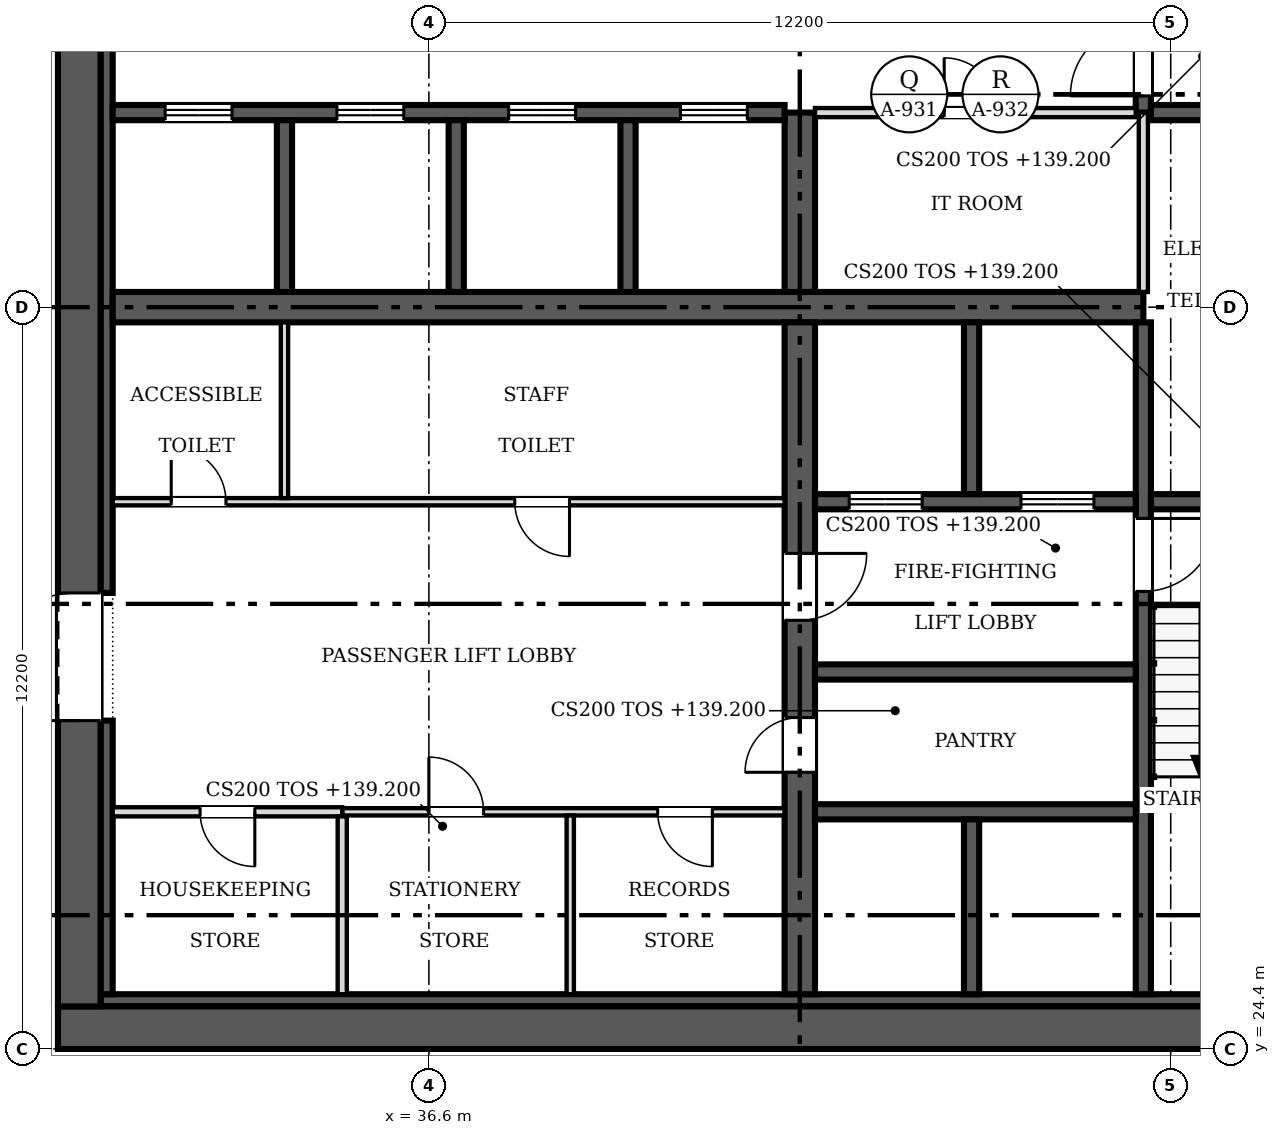
"""IFC4 building model, lengths in metres.
Left out: names, types, materials, properties, quantities, classifications, styles, units other than length and angle.
Written with IfcOpenShell. Run it as: python <this file> out.ifc"""

import sys

from ifc_helpers import new_model, si_unit, direction, frame, frame_2d, origin, place, context, subcontext, project, spatial, rectangle, extrude, source, transform, mapped, element, fill, save


model = new_model("IFC4")
c1 = context("Model", 3, precision=1e-05, world=origin(), true_north=direction((0.0, 1.0)))
c2 = subcontext(c1, "Body", "Model", "MODEL_VIEW")
j1 = project(units=[si_unit("LENGTHUNIT", "METRE"), si_unit("PLANEANGLEUNIT", "RADIAN")], contexts=[c1])
p1 = place(None, origin())
s1 = spatial("IfcSite", under=j1, at=p1, CompositionType="ELEMENT")
p2 = place(p1, origin())
s2 = spatial("IfcBuilding", under=s1, at=p2, CompositionType="ELEMENT")
p3 = place(p2, frame((0.0, 0.0, 139.2)))
s3 = spatial("IfcBuildingStorey", under=s2, at=p3, CompositionType="ELEMENT", Elevation=139.2)
p4 = place(p3, frame((54.9, 24.75, 0.0), z_axis=(0.0, 0.0, 1.0), x_axis=(-1.0, 0.0, 0.0)))
e1 = element("IfcWall", 1, at=p4, inside=s3, PredefinedType="SHEAR", context=c2, shape_type="SweptSolid", body=[
    extrude(rectangle(XDim=24.4, YDim=0.7, at=frame_2d((12.2, 0.0))), origin(), (0.0, 0.0, 1.0), 3.8),
])
m1 = source(origin(), c2, "Body", "SweptSolid", [
    extrude(rectangle(XDim=1.2, YDim=2.1, at=frame_2d((0.6, 1.05))), frame((0.0, 0.36, 0.0), z_axis=(0.0, -1.0, 0.0), x_axis=(1.0, 0.0, 0.0)), (0.0, 0.0, 1.0), 0.72),
])
p5 = place(p4, frame((1.5, 0.0, 0.0)))
e2 = element("IfcOpeningElement", 2, at=p5, cuts=e1, PredefinedType="OPENING", context=c2, shape_type="MappedRepresentation", body=[
    mapped(m1, transform((0.0, 0.0, 0.0), scale=1.0)),
])
p6 = place(p3, frame((30.85, 25.1, 0.0), z_axis=(0.0, 0.0, 1.0), x_axis=(0.0, 1.0, 0.0)))
e3 = element("IfcWall", 3, at=p6, inside=s3, PredefinedType="SHEAR", context=c2, shape_type="SweptSolid", body=[
    extrude(rectangle(XDim=23.0, YDim=0.7, at=frame_2d((11.5, 0.0))), origin(), (0.0, 0.0, 1.0), 3.8),
])
m2 = source(origin(), c2, "Body", "SweptSolid", [
    extrude(rectangle(XDim=2.1, YDim=2.4, at=frame_2d((1.05, 1.2))), frame((0.0, 0.36, 0.0), z_axis=(0.0, -1.0, 0.0), x_axis=(1.0, 0.0, 0.0)), (0.0, 0.0, 1.0), 0.72),
])
p7 = place(p6, frame((4.7, 0.0, 0.0)))
e4 = element("IfcOpeningElement", 4, at=p7, cuts=e3, PredefinedType="OPENING", context=c2, shape_type="MappedRepresentation", body=[
    mapped(m2, transform((0.0, 0.0, 0.0), scale=1.0)),
])
p8 = place(p6, frame((16.2, 0.0, 0.0)))
e5 = element("IfcOpeningElement", 5, at=p8, cuts=e3, PredefinedType="OPENING", context=c2, shape_type="MappedRepresentation", body=[
    mapped(m2, transform((0.0, 0.0, 0.0), scale=1.0)),
])
p9 = place(p3, frame((31.2, 25.2, 0.0), z_axis=(0.0, 0.0, 1.0), x_axis=(1.0, 0.0, 0.0)))
e6 = element("IfcWall", 6, at=p9, inside=s3, PredefinedType="SOLIDWALL", context=c2, shape_type="SweptSolid", body=[
    extrude(rectangle(XDim=21.0, YDim=0.2, at=frame_2d((10.5, 0.0))), origin(), (0.0, 0.0, 1.0), 3.8),
])
p10 = place(p3, frame((31.3, 25.3, 0.0), z_axis=(0.0, 0.0, 1.0), x_axis=(0.0, 1.0, 0.0)))
e7 = element("IfcWall", 7, at=p10, inside=s3, PredefinedType="SOLIDWALL", context=c2, shape_type="SweptSolid", body=[
    extrude(rectangle(XDim=4.5, YDim=0.2, at=frame_2d((2.25, 0.0))), origin(), (0.0, 0.0, 1.0), 3.8),
])
p11 = place(p3, frame((31.3, 31.9, 0.0), z_axis=(0.0, 0.0, 1.0), x_axis=(0.0, 1.0, 0.0)))
e8 = element("IfcWall", 8, at=p11, inside=s3, PredefinedType="SOLIDWALL", context=c2, shape_type="SweptSolid", body=[
    extrude(rectangle(XDim=9.4, YDim=0.2, at=frame_2d((4.7, 0.0))), origin(), (0.0, 0.0, 1.0), 3.8),
])
p12 = place(p3, frame((31.4, 36.6, 0.0), z_axis=(0.0, 0.0, 1.0), x_axis=(1.0, 0.0, 0.0)))
e9 = element("IfcWall", 9, at=p12, inside=s3, PredefinedType="SHEAR", context=c2, shape_type="SweptSolid", body=[
    extrude(rectangle(XDim=16.95, YDim=0.5, at=frame_2d((8.475, 0.0))), origin(), (0.0, 0.0, 1.0), 3.8),
])
p13 = place(p3, frame((42.7, 36.35, 0.0), z_axis=(0.0, 0.0, 1.0), x_axis=(0.0, -1.0, 0.0)))
e10 = element("IfcWall", 10, at=p13, inside=s3, PredefinedType="SHEAR", context=c2, shape_type="SweptSolid", body=[
    extrude(rectangle(XDim=11.05, YDim=0.5, at=frame_2d((5.525, 0.0))), origin(), (0.0, 0.0, 1.0), 3.8),
])
m3 = source(origin(), c2, "Body", "SweptSolid", [
    extrude(rectangle(XDim=0.9, YDim=2.1, at=frame_2d((0.45, 1.05))), frame((0.0, 0.26, 0.0), z_axis=(0.0, -1.0, 0.0), x_axis=(1.0, 0.0, 0.0)), (0.0, 0.0, 1.0), 0.52),
])
p14 = place(p13, frame((6.5, 0.0, 0.0)))
e11 = element("IfcOpeningElement", 11, at=p14, cuts=e10, PredefinedType="OPENING", context=c2, shape_type="MappedRepresentation", body=[
    mapped(m3, transform((0.0, 0.0, 0.0), scale=1.0)),
])
m4 = source(origin(), c2, "Body", "SweptSolid", [
    extrude(rectangle(XDim=1.1, YDim=2.1, at=frame_2d((0.55, 1.05))), frame((0.0, 0.26, 0.0), z_axis=(0.0, -1.0, 0.0), x_axis=(1.0, 0.0, 0.0)), (0.0, 0.0, 1.0), 0.52),
])
p15 = place(p13, frame((3.8, 0.0, 0.0)))
e12 = element("IfcOpeningElement", 12, at=p15, cuts=e10, PredefinedType="OPENING", context=c2, shape_type="MappedRepresentation", body=[
    mapped(m4, transform((0.0, 0.0, 0.0), scale=1.0)),
])
p16 = place(p3, frame((42.7, 36.85, 0.0), z_axis=(0.0, 0.0, 1.0), x_axis=(0.0, 1.0, 0.0)))
e13 = element("IfcWall", 13, at=p16, inside=s3, PredefinedType="SHEAR", context=c2, shape_type="SweptSolid", body=[
    extrude(rectangle(XDim=2.95, YDim=0.5, at=frame_2d((1.475, 0.0))), origin(), (0.0, 0.0, 1.0), 3.8),
])
p17 = place(p3, frame((31.4, 39.8, 0.0), z_axis=(0.0, 0.0, 1.0), x_axis=(1.0, 0.0, 0.0)))
e14 = element("IfcWall", 14, at=p17, inside=s3, PredefinedType="SOLIDWALL", context=c2, shape_type="SweptSolid", body=[
    extrude(rectangle(XDim=11.05, YDim=0.25, at=frame_2d((5.525, 0.0))), origin(), (0.0, 0.0, 1.0), 3.8),
])
m5 = source(origin(), c2, "Body", "SweptSolid", [
    extrude(rectangle(XDim=1.1, YDim=2.1, at=frame_2d((0.55, 1.05))), frame((0.0, 0.135, 0.0), z_axis=(0.0, -1.0, 0.0), x_axis=(1.0, 0.0, 0.0)), (0.0, 0.0, 1.0), 0.27),
])
p18 = place(p17, frame((0.863, 0.0, 0.0)))
e15 = element("IfcOpeningElement", 15, at=p18, cuts=e14, PredefinedType="OPENING", context=c2, shape_type="MappedRepresentation", body=[
    mapped(m5, transform((0.0, 0.0, 0.0), scale=1.0)),
])
p19 = place(p17, frame((3.688, 0.0, 0.0)))
e16 = element("IfcOpeningElement", 16, at=p19, cuts=e14, PredefinedType="OPENING", context=c2, shape_type="MappedRepresentation", body=[
    mapped(m5, transform((0.0, 0.0, 0.0), scale=1.0)),
])
p20 = place(p17, frame((6.512, 0.0, 0.0)))
e17 = element("IfcOpeningElement", 17, at=p20, cuts=e14, PredefinedType="OPENING", context=c2, shape_type="MappedRepresentation", body=[
    mapped(m5, transform((0.0, 0.0, 0.0), scale=1.0)),
])
p21 = place(p17, frame((9.337, 0.0, 0.0)))
e18 = element("IfcOpeningElement", 18, at=p21, cuts=e14, PredefinedType="OPENING", context=c2, shape_type="MappedRepresentation", body=[
    mapped(m5, transform((0.0, 0.0, 0.0), scale=1.0)),
])
p22 = place(p3, frame((48.35, 36.35, 0.0), z_axis=(0.0, 0.0, 1.0), x_axis=(0.0, -1.0, 0.0)))
e19 = element("IfcWall", 19, at=p22, inside=s3, PredefinedType="SOLIDWALL", context=c2, shape_type="SweptSolid", body=[
    extrude(rectangle(XDim=11.05, YDim=0.25, at=frame_2d((5.525, 0.0))), origin(), (0.0, 0.0, 1.0), 3.8),
])
m6 = source(origin(), c2, "Body", "SweptSolid", [
    extrude(rectangle(XDim=1.2, YDim=2.1, at=frame_2d((0.6, 1.05))), frame((0.0, 0.135, 0.0), z_axis=(0.0, -1.0, 0.0), x_axis=(1.0, 0.0, 0.0)), (0.0, 0.0, 1.0), 0.27),
])
p23 = place(p22, frame((3.225, 0.0, 0.0)))
e20 = element("IfcOpeningElement", 20, at=p23, cuts=e19, PredefinedType="OPENING", context=c2, shape_type="MappedRepresentation", body=[
    mapped(m6, transform((0.0, 0.0, 0.0), scale=1.0)),
])
p24 = place(p3, frame((48.225, 33.4, 0.0), z_axis=(0.0, 0.0, 1.0), x_axis=(-1.0, 0.0, 0.0)))
e21 = element("IfcWall", 21, at=p24, inside=s3, PredefinedType="SOLIDWALL", context=c2, shape_type="SweptSolid", body=[
    extrude(rectangle(XDim=5.275, YDim=0.25, at=frame_2d((2.638, 0.0))), origin(), (0.0, 0.0, 1.0), 3.8),
])
p25 = place(p24, frame((3.512, 0.0, 0.0)))
e22 = element("IfcOpeningElement", 22, at=p25, cuts=e21, PredefinedType="OPENING", context=c2, shape_type="MappedRepresentation", body=[
    mapped(m6, transform((0.0, 0.0, 0.0), scale=1.0)),
])
p26 = place(p24, frame((0.688, 0.0, 0.0)))
e23 = element("IfcOpeningElement", 23, at=p26, cuts=e21, PredefinedType="OPENING", context=c2, shape_type="MappedRepresentation", body=[
    mapped(m6, transform((0.0, 0.0, 0.0), scale=1.0)),
])
p27 = place(p3, frame((48.475, 33.4, 0.0), z_axis=(0.0, 0.0, 1.0), x_axis=(1.0, 0.0, 0.0)))
e24 = element("IfcWall", 24, at=p27, inside=s3, PredefinedType="SOLIDWALL", context=c2, shape_type="SweptSolid", body=[
    extrude(rectangle(XDim=3.525, YDim=0.25, at=frame_2d((1.762, 0.0))), origin(), (0.0, 0.0, 1.0), 3.8),
])
p28 = place(p3, frame((48.35, 47.9, 0.0), z_axis=(0.0, 0.0, 1.0), x_axis=(0.0, -1.0, 0.0)))
e25 = element("IfcWall", 25, at=p28, inside=s3, PredefinedType="SOLIDWALL", context=c2, shape_type="SweptSolid", body=[
    extrude(rectangle(XDim=8.1, YDim=0.25, at=frame_2d((4.05, 0.0))), origin(), (0.0, 0.0, 1.0), 3.8),
])
p29 = place(p28, frame((6.625, 0.0, 0.0)))
e26 = element("IfcOpeningElement", 26, at=p29, cuts=e25, PredefinedType="OPENING", context=c2, shape_type="MappedRepresentation", body=[
    mapped(m6, transform((0.0, 0.0, 0.0), scale=1.0)),
])
for number, where, z_axis, x_axis in (
    (27, (42.95, 28.3, 0.0), (0.0, 0.0, 1.0), (1.0, 0.0, 0.0)),
    (28, (42.95, 30.6, 0.0), (0.0, 0.0, 1.0), (1.0, 0.0, 0.0)),
):
    element("IfcWall", number, at=place(p3, frame(where, z_axis=z_axis, x_axis=x_axis)), inside=s3, PredefinedType="SOLIDWALL", context=c2, shape_type="SweptSolid", body=[
        extrude(rectangle(XDim=5.275, YDim=0.25, at=frame_2d((2.638, 0.0))), origin(), (0.0, 0.0, 1.0), 3.8),
    ])
p30 = place(p3, frame((48.475, 39.8, 0.0), z_axis=(0.0, 0.0, 1.0), x_axis=(1.0, 0.0, 0.0)))
e29 = element("IfcWall", 29, at=p30, inside=s3, PredefinedType="SOLIDWALL", context=c2, shape_type="SweptSolid", body=[
    extrude(rectangle(XDim=3.4, YDim=0.25, at=frame_2d((1.7, 0.0))), origin(), (0.0, 0.0, 1.0), 3.8),
])
for number, where, z_axis, x_axis in (
    (30, (34.225, 36.85, 0.0), (0.0, 0.0, 1.0), (0.0, 1.0, 0.0)),
    (31, (37.05, 36.85, 0.0), (0.0, 0.0, 1.0), (0.0, 1.0, 0.0)),
    (32, (39.875, 36.85, 0.0), (0.0, 0.0, 1.0), (0.0, 1.0, 0.0)),
):
    element("IfcWall", number, at=place(p3, frame(where, z_axis=z_axis, x_axis=x_axis)), inside=s3, PredefinedType="SOLIDWALL", context=c2, shape_type="SweptSolid", body=[
        extrude(rectangle(XDim=2.825, YDim=0.25, at=frame_2d((1.413, 0.0))), origin(), (0.0, 0.0, 1.0), 3.8),
    ])
p31 = place(p3, frame((45.525, 33.525, 0.0), z_axis=(0.0, 0.0, 1.0), x_axis=(0.0, 1.0, 0.0)))
e33 = element("IfcWall", 33, at=p31, inside=s3, PredefinedType="SOLIDWALL", context=c2, shape_type="SweptSolid", body=[
    extrude(rectangle(XDim=2.825, YDim=0.25, at=frame_2d((1.413, 0.0))), origin(), (0.0, 0.0, 1.0), 3.8),
])
p32 = place(p3, frame((45.525, 25.3, 0.0), z_axis=(0.0, 0.0, 1.0), x_axis=(0.0, 1.0, 0.0)))
e34 = element("IfcWall", 34, at=p32, inside=s3, PredefinedType="SOLIDWALL", context=c2, shape_type="SweptSolid", body=[
    extrude(rectangle(XDim=2.875, YDim=0.25, at=frame_2d((1.438, 0.0))), origin(), (0.0, 0.0, 1.0), 3.8),
])
p33 = place(p3, frame((31.4, 33.4, 0.0), z_axis=(0.0, 0.0, 1.0), x_axis=(1.0, 0.0, 0.0)))
e35 = element("IfcWall", 35, at=p33, inside=s3, PredefinedType="PARTITIONING", context=c2, shape_type="SweptSolid", body=[
    extrude(rectangle(XDim=11.05, YDim=0.12, at=frame_2d((5.525, 0.0))), origin(), (0.0, 0.0, 1.0), 3.6),
])
m7 = source(origin(), c2, "Body", "SweptSolid", [
    extrude(rectangle(XDim=0.9, YDim=2.1, at=frame_2d((0.45, 1.05))), frame((0.0, 0.07, 0.0), z_axis=(0.0, -1.0, 0.0), x_axis=(1.0, 0.0, 0.0)), (0.0, 0.0, 1.0), 0.14),
])
p34 = place(p33, frame((0.962, 0.0, 0.0)))
e36 = element("IfcOpeningElement", 36, at=p34, cuts=e35, PredefinedType="OPENING", context=c2, shape_type="MappedRepresentation", body=[
    mapped(m7, transform((0.0, 0.0, 0.0), scale=1.0)),
])
p35 = place(p33, frame((6.613, 0.0, 0.0)))
e37 = element("IfcOpeningElement", 37, at=p35, cuts=e35, PredefinedType="OPENING", context=c2, shape_type="MappedRepresentation", body=[
    mapped(m7, transform((0.0, 0.0, 0.0), scale=1.0)),
])
p36 = place(p3, frame((42.45, 28.3, 0.0), z_axis=(0.0, 0.0, 1.0), x_axis=(-1.0, 0.0, 0.0)))
e38 = element("IfcWall", 38, at=p36, inside=s3, PredefinedType="PARTITIONING", context=c2, shape_type="SweptSolid", body=[
    extrude(rectangle(XDim=7.275, YDim=0.12, at=frame_2d((3.637, 0.0))), origin(), (0.0, 0.0, 1.0), 3.6),
])
p37 = place(p36, frame((4.95, 0.0, 0.0)))
e39 = element("IfcOpeningElement", 39, at=p37, cuts=e38, PredefinedType="OPENING", context=c2, shape_type="MappedRepresentation", body=[
    mapped(m7, transform((0.0, 0.0, 0.0), scale=1.0)),
])
p38 = place(p36, frame((1.188, 0.0, 0.0)))
e40 = element("IfcOpeningElement", 40, at=p38, cuts=e38, PredefinedType="OPENING", context=c2, shape_type="MappedRepresentation", body=[
    mapped(m7, transform((0.0, 0.0, 0.0), scale=1.0)),
])
p39 = place(p3, frame((48.225, 39.8, 0.0), z_axis=(0.0, 0.0, 1.0), x_axis=(-1.0, 0.0, 0.0)))
e41 = element("IfcWall", 41, at=p39, inside=s3, PredefinedType="PARTITIONING", context=c2, shape_type="SweptSolid", body=[
    extrude(rectangle(XDim=5.275, YDim=0.15, at=frame_2d((2.638, 0.0))), origin(), (0.0, 0.0, 1.0), 3.6),
])
m8 = source(origin(), c2, "Body", "SweptSolid", [
    extrude(rectangle(XDim=0.9, YDim=2.1, at=frame_2d((0.45, 1.05))), frame((0.0, 0.085, 0.0), z_axis=(0.0, -1.0, 0.0), x_axis=(1.0, 0.0, 0.0)), (0.0, 0.0, 1.0), 0.17),
])
p40 = place(p39, frame((2.25, 0.0, 0.0)))
e42 = element("IfcOpeningElement", 42, at=p40, cuts=e41, PredefinedType="OPENING", context=c2, shape_type="MappedRepresentation", body=[
    mapped(m8, transform((0.0, 0.0, 0.0), scale=1.0)),
])
p41 = place(p3, frame((35.175, 28.3, 0.0), z_axis=(0.0, 0.0, 1.0), x_axis=(-1.0, 0.0, 0.0)))
e43 = element("IfcWall", 43, at=p41, inside=s3, PredefinedType="PARTITIONING", context=c2, shape_type="SweptSolid", body=[
    extrude(rectangle(XDim=3.775, YDim=0.15, at=frame_2d((1.888, 0.0))), origin(), (0.0, 0.0, 1.0), 3.6),
])
p42 = place(p41, frame((1.438, 0.0, 0.0)))
e44 = element("IfcOpeningElement", 44, at=p42, cuts=e43, PredefinedType="OPENING", context=c2, shape_type="MappedRepresentation", body=[
    mapped(m8, transform((0.0, 0.0, 0.0), scale=1.0)),
])
p43 = place(p3, frame((48.35, 36.85, 0.0), z_axis=(0.0, 0.0, 1.0), x_axis=(0.0, 1.0, 0.0)))
e45 = element("IfcWall", 45, at=p43, inside=s3, PredefinedType="PARTITIONING", context=c2, shape_type="SweptSolid", body=[
    extrude(rectangle(XDim=2.95, YDim=0.15, at=frame_2d((1.475, 0.0))), origin(), (0.0, 0.0, 1.0), 3.6),
])
p44 = place(p3, frame((34.225, 33.46, 0.0), z_axis=(0.0, 0.0, 1.0), x_axis=(0.0, 1.0, 0.0)))
e46 = element("IfcWall", 46, at=p44, inside=s3, PredefinedType="PARTITIONING", context=c2, shape_type="SweptSolid", body=[
    extrude(rectangle(XDim=2.89, YDim=0.12, at=frame_2d((1.445, 0.0))), origin(), (0.0, 0.0, 1.0), 3.6),
])
p45 = place(p3, frame((35.175, 25.3, 0.0), z_axis=(0.0, 0.0, 1.0), x_axis=(0.0, 1.0, 0.0)))
e47 = element("IfcWall", 47, at=p45, inside=s3, PredefinedType="PARTITIONING", context=c2, shape_type="SweptSolid", body=[
    extrude(rectangle(XDim=2.925, YDim=0.15, at=frame_2d((1.462, 0.0))), origin(), (0.0, 0.0, 1.0), 3.6),
])
p46 = place(p3, frame((38.925, 25.3, 0.0), z_axis=(0.0, 0.0, 1.0), x_axis=(0.0, 1.0, 0.0)))
e48 = element("IfcWall", 48, at=p46, inside=s3, PredefinedType="PARTITIONING", context=c2, shape_type="SweptSolid", body=[
    extrude(rectangle(XDim=2.94, YDim=0.12, at=frame_2d((1.47, 0.0))), origin(), (0.0, 0.0, 1.0), 3.6),
])
m9 = source(origin(), c2, "Body", "SweptSolid", [
    extrude(rectangle(XDim=2.1, YDim=2.4, at=frame_2d((1.05, 1.2))), frame((0.0, 0.025, 0.0), z_axis=(0.0, -1.0, 0.0), x_axis=(1.0, 0.0, 0.0)), (0.0, 0.0, 1.0), 0.05),
])
p47 = place(p7, origin())
e49 = element("IfcDoor", 49, at=p47, inside=s3, OperationType="DOUBLE_DOOR_SINGLE_SWING", PredefinedType="DOOR", context=c2, shape_type="MappedRepresentation", body=[
    mapped(m9, transform((0.0, 0.0, 0.0), scale=1.0)),
])
fill(e4, e49)
m10 = source(origin(), c2, "Body", "SweptSolid", [
    extrude(rectangle(XDim=0.9, YDim=2.1, at=frame_2d((0.45, 1.05))), frame((0.0, 0.025, 0.0), z_axis=(0.0, -1.0, 0.0), x_axis=(1.0, 0.0, 0.0)), (0.0, 0.0, 1.0), 0.05),
])
p48 = place(p14, origin())
e50 = element("IfcDoor", 50, at=p48, inside=s3, OperationType="SINGLE_SWING_RIGHT", PredefinedType="DOOR", context=c2, shape_type="MappedRepresentation", body=[
    mapped(m10, transform((0.0, 0.0, 0.0), scale=1.0)),
])
fill(e11, e50)
m11 = source(origin(), c2, "Body", "SweptSolid", [
    extrude(rectangle(XDim=1.1, YDim=2.1, at=frame_2d((0.55, 1.05))), frame((0.0, 0.025, 0.0), z_axis=(0.0, -1.0, 0.0), x_axis=(1.0, 0.0, 0.0)), (0.0, 0.0, 1.0), 0.05),
])
p49 = place(p15, origin())
e51 = element("IfcDoor", 51, at=p49, inside=s3, OperationType="SINGLE_SWING_LEFT", PredefinedType="DOOR", context=c2, shape_type="MappedRepresentation", body=[
    mapped(m11, transform((0.0, 0.0, 0.0), scale=1.0)),
])
fill(e12, e51)
p50 = place(p18, origin())
e52 = element("IfcDoor", 52, at=p50, inside=s3, OperationType="DOUBLE_DOOR_SLIDING", PredefinedType="DOOR", context=c2, shape_type="MappedRepresentation", body=[
    mapped(m11, transform((0.0, 0.0, 0.0), scale=1.0)),
])
fill(e15, e52)
p51 = place(p19, origin())
e53 = element("IfcDoor", 53, at=p51, inside=s3, OperationType="DOUBLE_DOOR_SLIDING", PredefinedType="DOOR", context=c2, shape_type="MappedRepresentation", body=[
    mapped(m11, transform((0.0, 0.0, 0.0), scale=1.0)),
])
fill(e16, e53)
p52 = place(p20, origin())
e54 = element("IfcDoor", 54, at=p52, inside=s3, OperationType="DOUBLE_DOOR_SLIDING", PredefinedType="DOOR", context=c2, shape_type="MappedRepresentation", body=[
    mapped(m11, transform((0.0, 0.0, 0.0), scale=1.0)),
])
fill(e17, e54)
p53 = place(p21, origin())
e55 = element("IfcDoor", 55, at=p53, inside=s3, OperationType="DOUBLE_DOOR_SLIDING", PredefinedType="DOOR", context=c2, shape_type="MappedRepresentation", body=[
    mapped(m11, transform((0.0, 0.0, 0.0), scale=1.0)),
])
fill(e18, e55)
m12 = source(origin(), c2, "Body", "SweptSolid", [
    extrude(rectangle(XDim=1.2, YDim=2.1, at=frame_2d((0.6, 1.05))), frame((0.0, 0.025, 0.0), z_axis=(0.0, -1.0, 0.0), x_axis=(1.0, 0.0, 0.0)), (0.0, 0.0, 1.0), 0.05),
])
p54 = place(p23, origin())
e56 = element("IfcDoor", 56, at=p54, inside=s3, OperationType="SINGLE_SWING_LEFT", PredefinedType="DOOR", context=c2, shape_type="MappedRepresentation", body=[
    mapped(m12, transform((0.0, 0.0, 0.0), scale=1.0)),
])
fill(e20, e56)
p55 = place(p25, origin())
e57 = element("IfcDoor", 57, at=p55, inside=s3, OperationType="DOUBLE_DOOR_SLIDING", PredefinedType="DOOR", context=c2, shape_type="MappedRepresentation", body=[
    mapped(m12, transform((0.0, 0.0, 0.0), scale=1.0)),
])
fill(e22, e57)
p56 = place(p26, origin())
e58 = element("IfcDoor", 58, at=p56, inside=s3, OperationType="DOUBLE_DOOR_SLIDING", PredefinedType="DOOR", context=c2, shape_type="MappedRepresentation", body=[
    mapped(m12, transform((0.0, 0.0, 0.0), scale=1.0)),
])
fill(e23, e58)
p57 = place(p29, origin())
e59 = element("IfcDoor", 59, at=p57, inside=s3, OperationType="SINGLE_SWING_RIGHT", PredefinedType="DOOR", context=c2, shape_type="MappedRepresentation", body=[
    mapped(m12, transform((0.0, 0.0, 0.0), scale=1.0)),
])
fill(e26, e59)
p58 = place(p34, origin())
e60 = element("IfcDoor", 60, at=p58, inside=s3, OperationType="SINGLE_SWING_LEFT", PredefinedType="DOOR", context=c2, shape_type="MappedRepresentation", body=[
    mapped(m10, transform((0.0, 0.0, 0.0), scale=1.0)),
])
fill(e36, e60)
p59 = place(p35, origin())
e61 = element("IfcDoor", 61, at=p59, inside=s3, OperationType="SINGLE_SWING_RIGHT", PredefinedType="DOOR", context=c2, shape_type="MappedRepresentation", body=[
    mapped(m10, transform((0.0, 0.0, 0.0), scale=1.0)),
])
fill(e37, e61)
p60 = place(p37, origin())
e62 = element("IfcDoor", 62, at=p60, inside=s3, OperationType="SINGLE_SWING_RIGHT", PredefinedType="DOOR", context=c2, shape_type="MappedRepresentation", body=[
    mapped(m10, transform((0.0, 0.0, 0.0), scale=1.0)),
])
fill(e39, e62)
p61 = place(p38, origin())
e63 = element("IfcDoor", 63, at=p61, inside=s3, OperationType="SINGLE_SWING_LEFT", PredefinedType="DOOR", context=c2, shape_type="MappedRepresentation", body=[
    mapped(m10, transform((0.0, 0.0, 0.0), scale=1.0)),
])
fill(e40, e63)
p62 = place(p40, origin())
e64 = element("IfcDoor", 64, at=p62, inside=s3, OperationType="SINGLE_SWING_RIGHT", PredefinedType="DOOR", context=c2, shape_type="MappedRepresentation", body=[
    mapped(m10, transform((0.0, 0.0, 0.0), scale=1.0)),
])
fill(e42, e64)
p63 = place(p42, origin())
e65 = element("IfcDoor", 65, at=p63, inside=s3, OperationType="SINGLE_SWING_LEFT", PredefinedType="DOOR", context=c2, shape_type="MappedRepresentation", body=[
    mapped(m10, transform((0.0, 0.0, 0.0), scale=1.0)),
])
fill(e44, e65)
save(model, sys.argv[1])
